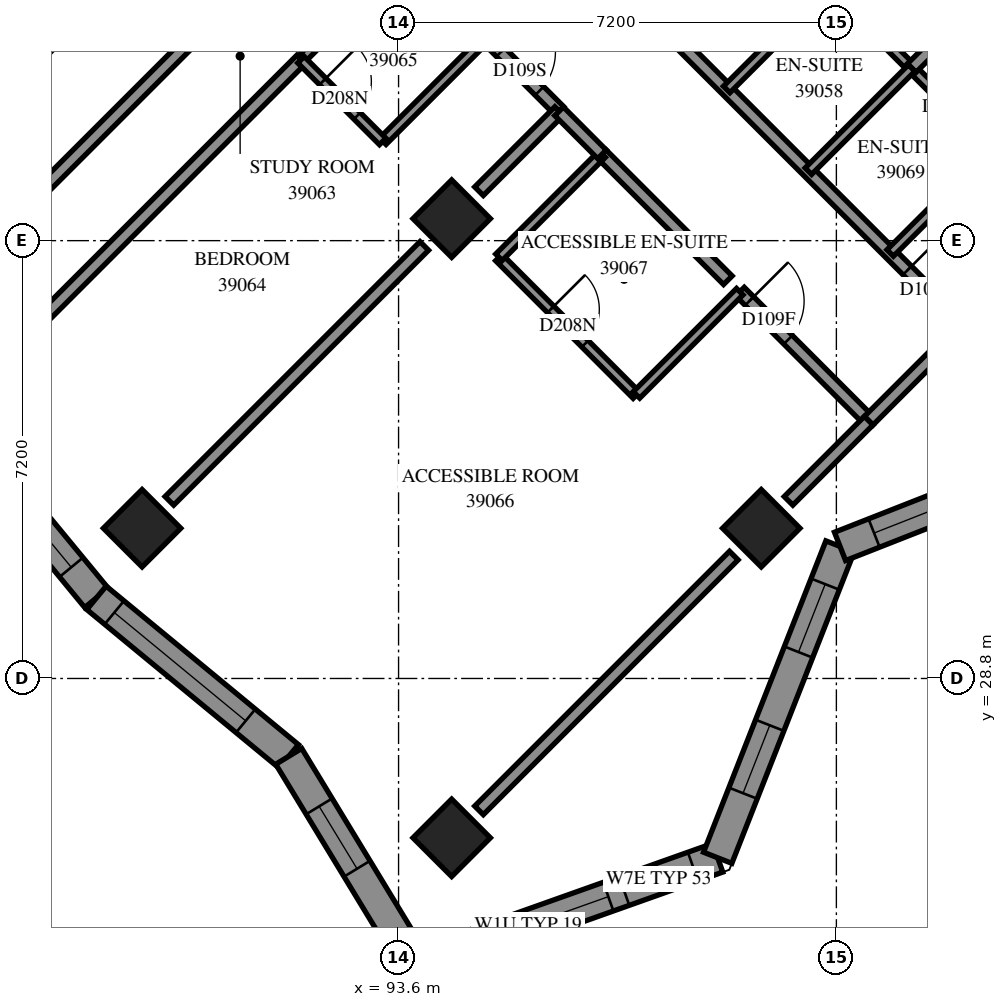
"""IFC4 building model, lengths in metres.
Left out: names, types, materials, properties, quantities, classifications, styles, units other than length and angle.
Written with IfcOpenShell. Run it as: python <this file> out.ifc"""

import sys

from ifc_helpers import new_model, si_unit, direction, frame, frame_2d, origin, origin_2d, place, context, subcontext, project, spatial, polyline, rectangle, outline, extrude, element, fill, save


model = new_model("IFC4")
c1 = context("Model", 3, precision=1e-05, world=origin(), true_north=direction((0.0, 1.0)))
c2 = subcontext(c1, "Body", "Model", "MODEL_VIEW")
j1 = project(units=[si_unit("LENGTHUNIT", "METRE"), si_unit("PLANEANGLEUNIT", "RADIAN")], contexts=[c1])
p1 = place(None, origin())
s1 = spatial("IfcSite", under=j1, at=p1, CompositionType="ELEMENT")
p2 = place(p1, origin())
s2 = spatial("IfcBuilding", under=s1, at=p2, CompositionType="ELEMENT")
p3 = place(p2, frame((0.0, 0.0, 145.6)))
s3 = spatial("IfcBuildingStorey", under=s2, at=p3, CompositionType="ELEMENT", Elevation=145.6)
for number, where, z_axis, x_axis in (
    (1, (94.474, 36.362, 0.0), (0.0, 0.0, 1.0), (0.707, -0.707, 0.0)),
    (2, (89.382, 31.271, 0.0), (0.0, 0.0, 1.0), (0.707, -0.707, 0.0)),
    (3, (99.565, 31.271, 0.0), (0.0, 0.0, 1.0), (0.707, -0.707, 0.0)),
    (4, (94.474, 26.18, 0.0), (0.0, 0.0, 1.0), (0.707, -0.707, 0.0)),
):
    element("IfcColumn", number, at=place(p3, frame(where, z_axis=z_axis, x_axis=x_axis)), inside=s3, PredefinedType="COLUMN", context=c2, shape_type="SweptSolid", body=[
        extrude(rectangle(XDim=0.9, YDim=0.9, at=origin_2d()), origin(), (0.0, 0.0, 1.0), 3.1),
    ])
p4 = place(p3, frame((87.049, 38.695, -0.3), z_axis=(0.0, 0.0, 1.0), x_axis=(0.7071067812, 0.7071067812, 0.0)))
e5 = element("IfcWall", 5, at=p4, inside=s3, PredefinedType="SHEAR", context=c2, shape_type="SweptSolid", body=[
    extrude(rectangle(XDim=14.4, YDim=0.6, at=frame_2d((7.2, 0.0))), origin(), (0.0, 0.0, 1.0), 2.7),
])
p5 = place(p4, frame((4.55, 0.0, 0.3)))
e6 = element("IfcOpeningElement", 6, at=p5, cuts=e5, PredefinedType="OPENING", context=c2, shape_type="SweptSolid", body=[
    extrude(rectangle(XDim=1.1, YDim=2.1, at=frame_2d((0.55, 1.05))), frame((0.0, 0.31, 0.0), z_axis=(0.0, -1.0, 0.0), x_axis=(1.0, 0.0, 0.0)), (0.0, 0.0, 1.0), 0.62),
])
p6 = place(p4, frame((11.35, 0.0, 0.3)))
e7 = element("IfcOpeningElement", 7, at=p6, cuts=e5, PredefinedType="OPENING", context=c2, shape_type="SweptSolid", body=[
    extrude(rectangle(XDim=1.1, YDim=2.1, at=frame_2d((0.55, 1.05))), frame((0.0, 0.31, 0.0), z_axis=(0.0, -1.0, 0.0), x_axis=(1.0, 0.0, 0.0)), (0.0, 0.0, 1.0), 0.62),
])
p7 = place(p3, frame((93.881, 24.085, 0.0), z_axis=(0.0, 0.0, 1.0), x_axis=(0.9422318528, 0.3349613941, 0.0)))
e8 = element("IfcWall", 8, at=p7, inside=s3, PredefinedType="SOLIDWALL", context=c2, shape_type="SweptSolid", body=[
    extrude(outline(polyline([(-0.203, -0.25), (5.386, -0.25), (5.158, 0.25), (0.203, 0.25), (-0.203, -0.25)])), origin(), (0.0, 0.0, 1.0), 3.1),
])
p8 = place(p7, frame((0.563, 0.0, 0.45)))
e9 = element("IfcOpeningElement", 9, at=p8, cuts=e8, PredefinedType="OPENING", context=c2, shape_type="SweptSolid", body=[
    extrude(rectangle(XDim=2.8, YDim=2.5, at=frame_2d((1.4, 1.25))), frame((0.0, 0.26, 0.0), z_axis=(0.0, -1.0, 0.0), x_axis=(1.0, 0.0, 0.0)), (0.0, 0.0, 1.0), 0.52),
])
p9 = place(p7, frame((3.64, 0.0, 0.45)))
e10 = element("IfcOpeningElement", 10, at=p9, cuts=e8, PredefinedType="OPENING", context=c2, shape_type="SweptSolid", body=[
    extrude(rectangle(XDim=1.2, YDim=2.5, at=frame_2d((0.6, 1.25))), frame((0.0, 0.26, 0.0), z_axis=(0.0, -1.0, 0.0), x_axis=(1.0, 0.0, 0.0)), (0.0, 0.0, 1.0), 0.52),
])
p10 = place(p3, frame((98.848, 25.851, 0.0), z_axis=(0.0, 0.0, 1.0), x_axis=(0.3657018614, 0.9307320498, 0.0)))
e11 = element("IfcWall", 11, at=p10, inside=s3, PredefinedType="SOLIDWALL", context=c2, shape_type="SweptSolid", body=[
    extrude(outline(polyline([(-0.114, -0.25), (5.393, -0.25), (5.61, 0.25), (0.114, 0.25), (-0.114, -0.25)])), origin(), (0.0, 0.0, 1.0), 3.1),
])
p11 = place(p10, frame((1.141, 0.0, 0.45)))
e12 = element("IfcOpeningElement", 12, at=p11, cuts=e11, PredefinedType="OPENING", context=c2, shape_type="SweptSolid", body=[
    extrude(rectangle(XDim=1.2, YDim=2.5, at=frame_2d((0.6, 1.25))), frame((0.0, 0.26, 0.0), z_axis=(0.0, -1.0, 0.0), x_axis=(1.0, 0.0, 0.0)), (0.0, 0.0, 1.0), 0.52),
])
p12 = place(p10, frame((3.635, 0.0, 0.45)))
e13 = element("IfcOpeningElement", 13, at=p12, cuts=e11, PredefinedType="OPENING", context=c2, shape_type="SweptSolid", body=[
    extrude(rectangle(XDim=1.2, YDim=2.5, at=frame_2d((0.6, 1.25))), frame((0.0, 0.26, 0.0), z_axis=(0.0, -1.0, 0.0), x_axis=(1.0, 0.0, 0.0)), (0.0, 0.0, 1.0), 0.52),
])
p13 = place(p3, frame((100.86, 30.972, 0.0), z_axis=(0.0, 0.0, 1.0), x_axis=(0.9307296188, 0.3657080484, 0.0)))
e14 = element("IfcWall", 14, at=p13, inside=s3, PredefinedType="SOLIDWALL", context=c2, shape_type="SweptSolid", body=[
    extrude(outline(polyline([(0.109, -0.25), (5.615, -0.25), (5.388, 0.25), (-0.109, 0.25), (0.109, -0.25)])), origin(), (0.0, 0.0, 1.0), 3.1),
])
p14 = place(p13, frame((0.602, 0.0, 0.45)))
e15 = element("IfcOpeningElement", 15, at=p14, cuts=e14, PredefinedType="OPENING", context=c2, shape_type="SweptSolid", body=[
    extrude(rectangle(XDim=2.8, YDim=2.5, at=frame_2d((1.4, 1.25))), frame((0.0, 0.26, 0.0), z_axis=(0.0, -1.0, 0.0), x_axis=(1.0, 0.0, 0.0)), (0.0, 0.0, 1.0), 0.52),
])
p15 = place(p3, frame((86.037, 33.274, 0.0), z_axis=(0.0, 0.0, 1.0), x_axis=(0.636083527, -0.7716202088, 0.0)))
e16 = element("IfcWall", 16, at=p15, inside=s3, PredefinedType="SOLIDWALL", context=c2, shape_type="SweptSolid", body=[
    extrude(outline(polyline([(0.024, -0.25), (4.103, -0.25), (4.055, 0.25), (-0.024, 0.25), (0.024, -0.25)])), origin(), (0.0, 0.0, 1.0), 3.1),
])
p16 = place(p15, frame((0.628, 0.0, 0.45)))
e17 = element("IfcOpeningElement", 17, at=p16, cuts=e16, PredefinedType="OPENING", context=c2, shape_type="SweptSolid", body=[
    extrude(rectangle(XDim=2.8, YDim=2.5, at=frame_2d((1.4, 1.25))), frame((0.0, 0.26, 0.0), z_axis=(0.0, -1.0, 0.0), x_axis=(1.0, 0.0, 0.0)), (0.0, 0.0, 1.0), 0.52),
])
p17 = place(p3, frame((88.632, 30.126, 0.0), z_axis=(0.0, 0.0, 1.0), x_axis=(0.7716131261, -0.6360921188, 0.0)))
e18 = element("IfcWall", 18, at=p17, inside=s3, PredefinedType="SOLIDWALL", context=c2, shape_type="SweptSolid", body=[
    extrude(outline(polyline([(-0.024, -0.25), (4.055, -0.25), (4.14, 0.25), (0.024, 0.25), (-0.024, -0.25)])), origin(), (0.0, 0.0, 1.0), 3.1),
])
p18 = place(p17, frame((0.38, 0.0, 0.45)))
e19 = element("IfcOpeningElement", 19, at=p18, cuts=e18, PredefinedType="OPENING", context=c2, shape_type="SweptSolid", body=[
    extrude(rectangle(XDim=2.8, YDim=2.5, at=frame_2d((1.4, 1.25))), frame((0.0, 0.26, 0.0), z_axis=(0.0, -1.0, 0.0), x_axis=(1.0, 0.0, 0.0)), (0.0, 0.0, 1.0), 0.52),
])
p19 = place(p3, frame((91.794, 27.52, 0.0), z_axis=(0.0, 0.0, 1.0), x_axis=(0.5192962899, -0.8545942682, 0.0)))
e20 = element("IfcWall", 20, at=p19, inside=s3, PredefinedType="SOLIDWALL", context=c2, shape_type="SweptSolid", body=[
    extrude(outline(polyline([(0.042, -0.25), (4.222, -0.25), (3.815, 0.25), (-0.042, 0.25), (0.042, -0.25)])), origin(), (0.0, 0.0, 1.0), 3.1),
])
p20 = place(p19, frame((0.963, 0.0, 0.45)))
e21 = element("IfcOpeningElement", 21, at=p20, cuts=e20, PredefinedType="OPENING", context=c2, shape_type="SweptSolid", body=[
    extrude(rectangle(XDim=1.2, YDim=2.5, at=frame_2d((0.6, 1.25))), frame((0.0, 0.26, 0.0), z_axis=(0.0, -1.0, 0.0), x_axis=(1.0, 0.0, 0.0)), (0.0, 0.0, 1.0), 0.52),
])
p21 = place(p3, frame((94.189, 43.287, 0.0), z_axis=(0.0, 0.0, 1.0), x_axis=(0.7071067812, -0.7071067812, 0.0)))
e22 = element("IfcWall", 22, at=p21, inside=s3, PredefinedType="PARTITIONING", context=c2, shape_type="SweptSolid", body=[
    extrude(rectangle(XDim=12.298, YDim=0.2, at=frame_2d((6.149, 0.0))), origin(), (0.0, 0.0, 1.0), 3.1),
])
p22 = place(p21, frame((3.755, 0.0, 0.0)))
e23 = element("IfcOpeningElement", 23, at=p22, cuts=e22, PredefinedType="OPENING", context=c2, shape_type="SweptSolid", body=[
    extrude(rectangle(XDim=0.9, YDim=2.1, at=frame_2d((0.45, 1.05))), frame((0.0, 0.11, 0.0), z_axis=(0.0, -1.0, 0.0), x_axis=(1.0, 0.0, 0.0)), (0.0, 0.0, 1.0), 0.22),
])
p23 = place(p21, frame((10.998, 0.0, 0.0)))
e24 = element("IfcOpeningElement", 24, at=p23, cuts=e22, PredefinedType="OPENING", context=c2, shape_type="SweptSolid", body=[
    extrude(rectangle(XDim=0.9, YDim=2.1, at=frame_2d((0.45, 1.05))), frame((0.0, 0.11, 0.0), z_axis=(0.0, -1.0, 0.0), x_axis=(1.0, 0.0, 0.0)), (0.0, 0.0, 1.0), 0.22),
])
p24 = place(p3, frame((86.836, 35.938, 0.0), z_axis=(0.0, 0.0, 1.0), x_axis=(0.7071067812, 0.7071067812, 0.0)))
e25 = element("IfcWall", 25, at=p24, inside=s3, PredefinedType="PARTITIONING", context=c2, shape_type="SweptSolid", body=[
    extrude(rectangle(XDim=8.2, YDim=0.2, at=frame_2d((4.1, 0.0))), origin(), (0.0, 0.0, 1.0), 3.1),
])
p25 = place(p3, frame((86.33, 33.311, 0.0), z_axis=(0.0, 0.0, 1.0), x_axis=(0.7071005425, 0.7071130198, 0.0)))
e26 = element("IfcWall", 26, at=p25, inside=s3, PredefinedType="PARTITIONING", context=c2, shape_type="SweptSolid", body=[
    extrude(rectangle(XDim=8.015, YDim=0.2, at=frame_2d((4.007, 0.0))), origin(), (0.0, 0.0, 1.0), 3.1),
])
p26 = place(p3, frame((89.831, 31.721, 0.0), z_axis=(0.0, 0.0, 1.0), x_axis=(0.7071067812, 0.7071067812, 0.0)))
e27 = element("IfcWall", 27, at=p26, inside=s3, PredefinedType="PARTITIONING", context=c2, shape_type="SweptSolid", body=[
    extrude(rectangle(XDim=5.928, YDim=0.2, at=frame_2d((2.964, 0.0))), origin(), (0.0, 0.0, 1.0), 3.1),
])
p27 = place(p3, frame((94.923, 26.631, 0.0), z_axis=(0.0, 0.0, 1.0), x_axis=(0.7071067812, 0.7071067812, 0.0)))
e28 = element("IfcWall", 28, at=p27, inside=s3, PredefinedType="PARTITIONING", context=c2, shape_type="SweptSolid", body=[
    extrude(rectangle(XDim=5.926, YDim=0.2, at=frame_2d((2.963, 0.0))), origin(), (0.0, 0.0, 1.0), 2.6),
])
p28 = place(p3, frame((92.639, 41.739, 0.0), z_axis=(0.0, 0.0, 1.0), x_axis=(0.7071067812, -0.7071067812, 0.0)))
e29 = element("IfcWall", 29, at=p28, inside=s3, PredefinedType="PARTITIONING", context=c2, shape_type="SweptSolid", body=[
    extrude(rectangle(XDim=5.1, YDim=0.2, at=frame_2d((2.55, 0.0))), origin(), (0.0, 0.0, 1.0), 3.1),
])
p29 = place(p28, frame((0.123, 0.0, 0.0)))
e30 = element("IfcOpeningElement", 30, at=p29, cuts=e29, PredefinedType="OPENING", context=c2, shape_type="SweptSolid", body=[
    extrude(rectangle(XDim=1.0, YDim=2.1, at=frame_2d((0.5, 1.05))), frame((0.0, 0.11, 0.0), z_axis=(0.0, -1.0, 0.0), x_axis=(1.0, 0.0, 0.0)), (0.0, 0.0, 1.0), 0.22),
])
p30 = place(p28, frame((3.734, 0.0, 0.0)))
e31 = element("IfcOpeningElement", 31, at=p30, cuts=e29, PredefinedType="OPENING", context=c2, shape_type="SweptSolid", body=[
    extrude(rectangle(XDim=0.9, YDim=2.1, at=frame_2d((0.45, 1.05))), frame((0.0, 0.11, 0.0), z_axis=(0.0, -1.0, 0.0), x_axis=(1.0, 0.0, 0.0)), (0.0, 0.0, 1.0), 0.22),
])
p31 = place(p3, frame((100.694, 40.178, 0.0), z_axis=(0.0, 0.0, 1.0), x_axis=(0.7076329021, -0.7065802685, 0.0)))
e32 = element("IfcWall", 32, at=p31, inside=s3, PredefinedType="PARTITIONING", context=c2, shape_type="SweptSolid", body=[
    extrude(rectangle(XDim=3.8, YDim=0.15, at=frame_2d((1.9, 0.0))), origin(), (0.0, 0.0, 1.0), 3.1),
])
p32 = place(p31, frame((0.598, 0.0, 0.0)))
e33 = element("IfcOpeningElement", 33, at=p32, cuts=e32, PredefinedType="OPENING", context=c2, shape_type="SweptSolid", body=[
    extrude(rectangle(XDim=0.8, YDim=2.1, at=frame_2d((0.4, 1.05))), frame((0.0, 0.085, 0.0), z_axis=(0.0, -1.0, 0.0), x_axis=(1.0, 0.0, 0.0)), (0.0, 0.0, 1.0), 0.17),
])
p33 = place(p31, frame((2.405, 0.0, 0.0)))
e34 = element("IfcOpeningElement", 34, at=p33, cuts=e32, PredefinedType="OPENING", context=c2, shape_type="SweptSolid", body=[
    extrude(rectangle(XDim=0.8, YDim=2.1, at=frame_2d((0.4, 1.05))), frame((0.0, 0.085, 0.0), z_axis=(0.0, -1.0, 0.0), x_axis=(1.0, 0.0, 0.0)), (0.0, 0.0, 1.0), 0.17),
])
p34 = place(p3, frame((95.249, 35.723, 0.0), z_axis=(0.0, 0.0, 1.0), x_axis=(0.7067942478, -0.7074191764, 0.0)))
e35 = element("IfcWall", 35, at=p34, inside=s3, PredefinedType="PARTITIONING", context=c2, shape_type="SweptSolid", body=[
    extrude(rectangle(XDim=3.2, YDim=0.15, at=frame_2d((1.6, 0.0))), origin(), (0.0, 0.0, 1.0), 3.1),
])
p35 = place(p34, frame((1.206, 0.0, 0.0)))
e36 = element("IfcOpeningElement", 36, at=p35, cuts=e35, PredefinedType="OPENING", context=c2, shape_type="SweptSolid", body=[
    extrude(rectangle(XDim=0.8, YDim=2.1, at=frame_2d((0.4, 1.05))), frame((0.0, 0.085, 0.0), z_axis=(0.0, -1.0, 0.0), x_axis=(1.0, 0.0, 0.0)), (0.0, 0.0, 1.0), 0.17),
])
p36 = place(p3, frame((102.04, 38.838, 0.0), z_axis=(0.0, 0.0, 1.0), x_axis=(0.7071067812, 0.7071067812, 0.0)))
e37 = element("IfcWall", 37, at=p36, inside=s3, PredefinedType="PARTITIONING", context=c2, shape_type="SweptSolid", body=[
    extrude(rectangle(XDim=3.199, YDim=0.2, at=frame_2d((1.599, 0.0))), origin(), (0.0, 0.0, 1.0), 3.1),
])
p37 = place(p3, frame((99.214, 35.162, 0.0), z_axis=(0.0, 0.0, 1.0), x_axis=(0.706773319, -0.7074400862, 0.0)))
e38 = element("IfcWall", 38, at=p37, inside=s3, PredefinedType="PARTITIONING", context=c2, shape_type="SweptSolid", body=[
    extrude(rectangle(XDim=2.999, YDim=0.2, at=frame_2d((1.5, 0.0))), origin(), (0.0, 0.0, 1.0), 3.1),
])
p38 = place(p37, frame((0.22, 0.0, 0.0)))
e39 = element("IfcOpeningElement", 39, at=p38, cuts=e38, PredefinedType="OPENING", context=c2, shape_type="SweptSolid", body=[
    extrude(rectangle(XDim=0.9, YDim=2.1, at=frame_2d((0.45, 1.05))), frame((0.0, 0.11, 0.0), z_axis=(0.0, -1.0, 0.0), x_axis=(1.0, 0.0, 0.0)), (0.0, 0.0, 1.0), 0.22),
])
p39 = place(p3, frame((96.945, 37.419, 0.0), z_axis=(0.0, 0.0, 1.0), x_axis=(0.7071067812, -0.7071067812, 0.0)))
e40 = element("IfcWall", 40, at=p39, inside=s3, PredefinedType="PARTITIONING", context=c2, shape_type="SweptSolid", body=[
    extrude(rectangle(XDim=2.927, YDim=0.2, at=frame_2d((1.464, 0.0))), origin(), (0.0, 0.0, 1.0), 3.1),
])
for number, where, z_axis, x_axis in (
    (41, (97.513, 33.463, 0.0), (0.0, 0.0, 1.0), (0.707, 0.707, 0.0)),
    (42, (93.341, 37.635, 0.0), (0.0, 0.0, 1.0), (0.707, 0.707, 0.0)),
    (43, (101.685, 35.797, 0.0), (0.0, 0.0, 1.0), (0.707, 0.707, 0.0)),
    (44, (91.997, 38.979, 0.0), (0.0, 0.0, 1.0), (0.707, 0.707, 0.0)),
):
    element("IfcWall", number, at=place(p3, frame(where, z_axis=z_axis, x_axis=x_axis)), inside=s3, PredefinedType="PARTITIONING", context=c2, shape_type="SweptSolid", body=[
        extrude(rectangle(XDim=2.401, YDim=0.15, at=frame_2d((1.201, 0.0))), origin(), (0.0, 0.0, 1.0), 3.1),
    ])
for number, where, z_axis, x_axis in (
    (45, (100.34, 37.142, 0.0), (0.0, 0.0, 1.0), (0.708, 0.707, 0.0)),
    (46, (98.996, 38.486, 0.0), (0.0, 0.0, 1.0), (0.708, 0.707, 0.0)),
):
    element("IfcWall", number, at=place(p3, frame(where, z_axis=z_axis, x_axis=x_axis)), inside=s3, PredefinedType="PARTITIONING", context=c2, shape_type="SweptSolid", body=[
        extrude(rectangle(XDim=2.4, YDim=0.15, at=frame_2d((1.2, 0.0))), origin(), (0.0, 0.0, 1.0), 3.1),
    ])
p40 = place(p3, frame((95.251, 35.727, 0.0), z_axis=(0.0, 0.0, 1.0), x_axis=(0.7071067812, 0.7071067812, 0.0)))
e47 = element("IfcWall", 47, at=p40, inside=s3, PredefinedType="PARTITIONING", context=c2, shape_type="SweptSolid", body=[
    extrude(rectangle(XDim=2.398, YDim=0.15, at=frame_2d((1.199, 0.0))), origin(), (0.0, 0.0, 1.0), 3.1),
])
p41 = place(p3, frame((101.331, 33.039, 0.0), z_axis=(0.0, 0.0, 1.0), x_axis=(0.7071067812, 0.7071067812, 0.0)))
e48 = element("IfcWall", 48, at=p41, inside=s3, PredefinedType="PARTITIONING", context=c2, shape_type="SweptSolid", body=[
    extrude(rectangle(XDim=2.2, YDim=0.2, at=frame_2d((1.1, 0.0))), origin(), (0.0, 0.0, 1.0), 2.6),
])
p42 = place(p3, frame((91.995, 38.975, 0.0), z_axis=(0.0, 0.0, 1.0), x_axis=(0.7071067812, -0.7071067812, 0.0)))
e49 = element("IfcWall", 49, at=p42, inside=s3, PredefinedType="PARTITIONING", context=c2, shape_type="SweptSolid", body=[
    extrude(rectangle(XDim=1.901, YDim=0.15, at=frame_2d((0.95, 0.0))), origin(), (0.0, 0.0, 1.0), 3.1),
])
p43 = place(p42, frame((0.506, 0.0, 0.0)))
e50 = element("IfcOpeningElement", 50, at=p43, cuts=e49, PredefinedType="OPENING", context=c2, shape_type="SweptSolid", body=[
    extrude(rectangle(XDim=0.8, YDim=2.1, at=frame_2d((0.4, 1.05))), frame((0.0, 0.085, 0.0), z_axis=(0.0, -1.0, 0.0), x_axis=(1.0, 0.0, 0.0)), (0.0, 0.0, 1.0), 0.17),
])
p44 = place(p3, frame((94.923, 36.813, 0.0), z_axis=(0.0, 0.0, 1.0), x_axis=(0.7071067812, 0.7071067812, 0.0)))
e51 = element("IfcWall", 51, at=p44, inside=s3, PredefinedType="PARTITIONING", context=c2, shape_type="SweptSolid", body=[
    extrude(rectangle(XDim=1.864, YDim=0.2, at=frame_2d((0.932, 0.0))), origin(), (0.0, 0.0, 1.0), 3.1),
])
p45 = place(p3, frame((100.013, 31.721, 0.0), z_axis=(0.0, 0.0, 1.0), x_axis=(0.7071067812, 0.7071067812, 0.0)))
e52 = element("IfcWall", 52, at=p45, inside=s3, PredefinedType="PARTITIONING", context=c2, shape_type="SweptSolid", body=[
    extrude(rectangle(XDim=1.864, YDim=0.2, at=frame_2d((0.932, 0.0))), origin(), (0.0, 0.0, 1.0), 2.6),
])
p46 = place(p3, frame((96.24, 38.128, 0.0), z_axis=(0.0, 0.0, 1.0), x_axis=(0.7061059238, -0.7081062239, 0.0)))
e53 = element("IfcWall", 53, at=p46, inside=s3, PredefinedType="PARTITIONING", context=c2, shape_type="SweptSolid", body=[
    extrude(rectangle(XDim=1.0, YDim=0.2, at=frame_2d((0.5, 0.0))), origin(), (0.0, 0.0, 1.0), 3.1),
])
p47 = place(p8, origin())
e54 = element("IfcWindow", 54, at=p47, inside=s3, PartitioningType="SINGLE_PANEL", PredefinedType="WINDOW", context=c2, shape_type="SweptSolid", body=[
    extrude(rectangle(XDim=2.8, YDim=2.5, at=frame_2d((1.4, 1.25))), frame((0.0, 0.18, 0.0), z_axis=(0.0, -1.0, 0.0), x_axis=(1.0, 0.0, 0.0)), (0.0, 0.0, 1.0), 0.06),
])
fill(e9, e54)
p48 = place(p9, origin())
e55 = element("IfcWindow", 55, at=p48, inside=s3, PartitioningType="SINGLE_PANEL", PredefinedType="WINDOW", context=c2, shape_type="SweptSolid", body=[
    extrude(rectangle(XDim=1.2, YDim=2.5, at=frame_2d((0.6, 1.25))), frame((0.0, 0.18, 0.0), z_axis=(0.0, -1.0, 0.0), x_axis=(1.0, 0.0, 0.0)), (0.0, 0.0, 1.0), 0.06),
])
fill(e10, e55)
p49 = place(p11, origin())
e56 = element("IfcWindow", 56, at=p49, inside=s3, PartitioningType="SINGLE_PANEL", PredefinedType="WINDOW", context=c2, shape_type="SweptSolid", body=[
    extrude(rectangle(XDim=1.2, YDim=2.5, at=frame_2d((0.6, 1.25))), frame((0.0, 0.18, 0.0), z_axis=(0.0, -1.0, 0.0), x_axis=(1.0, 0.0, 0.0)), (0.0, 0.0, 1.0), 0.06),
])
fill(e12, e56)
p50 = place(p12, origin())
e57 = element("IfcWindow", 57, at=p50, inside=s3, PartitioningType="SINGLE_PANEL", PredefinedType="WINDOW", context=c2, shape_type="SweptSolid", body=[
    extrude(rectangle(XDim=1.2, YDim=2.5, at=frame_2d((0.6, 1.25))), frame((0.0, 0.18, 0.0), z_axis=(0.0, -1.0, 0.0), x_axis=(1.0, 0.0, 0.0)), (0.0, 0.0, 1.0), 0.06),
])
fill(e13, e57)
p51 = place(p14, origin())
e58 = element("IfcWindow", 58, at=p51, inside=s3, PartitioningType="SINGLE_PANEL", PredefinedType="WINDOW", context=c2, shape_type="SweptSolid", body=[
    extrude(rectangle(XDim=2.8, YDim=2.5, at=frame_2d((1.4, 1.25))), frame((0.0, 0.18, 0.0), z_axis=(0.0, -1.0, 0.0), x_axis=(1.0, 0.0, 0.0)), (0.0, 0.0, 1.0), 0.06),
])
fill(e15, e58)
p52 = place(p16, origin())
e59 = element("IfcWindow", 59, at=p52, inside=s3, PartitioningType="SINGLE_PANEL", PredefinedType="WINDOW", context=c2, shape_type="SweptSolid", body=[
    extrude(rectangle(XDim=2.8, YDim=2.5, at=frame_2d((1.4, 1.25))), frame((0.0, 0.18, 0.0), z_axis=(0.0, -1.0, 0.0), x_axis=(1.0, 0.0, 0.0)), (0.0, 0.0, 1.0), 0.06),
])
fill(e17, e59)
p53 = place(p18, origin())
e60 = element("IfcWindow", 60, at=p53, inside=s3, PartitioningType="SINGLE_PANEL", PredefinedType="WINDOW", context=c2, shape_type="SweptSolid", body=[
    extrude(rectangle(XDim=2.8, YDim=2.5, at=frame_2d((1.4, 1.25))), frame((0.0, 0.18, 0.0), z_axis=(0.0, -1.0, 0.0), x_axis=(1.0, 0.0, 0.0)), (0.0, 0.0, 1.0), 0.06),
])
fill(e19, e60)
p54 = place(p20, origin())
e61 = element("IfcWindow", 61, at=p54, inside=s3, PartitioningType="SINGLE_PANEL", PredefinedType="WINDOW", context=c2, shape_type="SweptSolid", body=[
    extrude(rectangle(XDim=1.2, YDim=2.5, at=frame_2d((0.6, 1.25))), frame((0.0, 0.18, 0.0), z_axis=(0.0, -1.0, 0.0), x_axis=(1.0, 0.0, 0.0)), (0.0, 0.0, 1.0), 0.06),
])
fill(e21, e61)
p55 = place(p30, origin())
e62 = element("IfcDoor", 62, at=p55, inside=s3, OperationType="SINGLE_SWING_LEFT", PredefinedType="DOOR", context=c2, shape_type="SweptSolid", body=[
    extrude(rectangle(XDim=0.9, YDim=2.1, at=frame_2d((0.45, 1.05))), frame((0.0, 0.025, 0.0), z_axis=(0.0, -1.0, 0.0), x_axis=(1.0, 0.0, 0.0)), (0.0, 0.0, 1.0), 0.05),
])
fill(e31, e62)
p56 = place(p43, origin())
e63 = element("IfcDoor", 63, at=p56, inside=s3, OperationType="SINGLE_SWING_RIGHT", PredefinedType="DOOR", context=c2, shape_type="SweptSolid", body=[
    extrude(rectangle(XDim=0.8, YDim=2.1, at=frame_2d((0.4, 1.05))), frame((0.0, 0.025, 0.0), z_axis=(0.0, -1.0, 0.0), x_axis=(1.0, 0.0, 0.0)), (0.0, 0.0, 1.0), 0.05),
])
fill(e50, e63)
p57 = place(p38, origin())
e64 = element("IfcDoor", 64, at=p57, inside=s3, OperationType="SINGLE_SWING_RIGHT", PredefinedType="DOOR", context=c2, shape_type="SweptSolid", body=[
    extrude(rectangle(XDim=0.9, YDim=2.1, at=frame_2d((0.45, 1.05))), frame((0.0, 0.025, 0.0), z_axis=(0.0, -1.0, 0.0), x_axis=(1.0, 0.0, 0.0)), (0.0, 0.0, 1.0), 0.05),
])
fill(e39, e64)
p58 = place(p35, origin())
e65 = element("IfcDoor", 65, at=p58, inside=s3, OperationType="SINGLE_SWING_RIGHT", PredefinedType="DOOR", context=c2, shape_type="SweptSolid", body=[
    extrude(rectangle(XDim=0.8, YDim=2.1, at=frame_2d((0.4, 1.05))), frame((0.0, 0.025, 0.0), z_axis=(0.0, -1.0, 0.0), x_axis=(1.0, 0.0, 0.0)), (0.0, 0.0, 1.0), 0.05),
])
fill(e36, e65)
p59 = place(p23, origin())
e66 = element("IfcDoor", 66, at=p59, inside=s3, OperationType="SINGLE_SWING_RIGHT", PredefinedType="DOOR", context=c2, shape_type="SweptSolid", body=[
    extrude(rectangle(XDim=0.9, YDim=2.1, at=frame_2d((0.45, 1.05))), frame((0.0, 0.025, 0.0), z_axis=(0.0, -1.0, 0.0), x_axis=(1.0, 0.0, 0.0)), (0.0, 0.0, 1.0), 0.05),
])
fill(e24, e66)
save(model, sys.argv[1])
